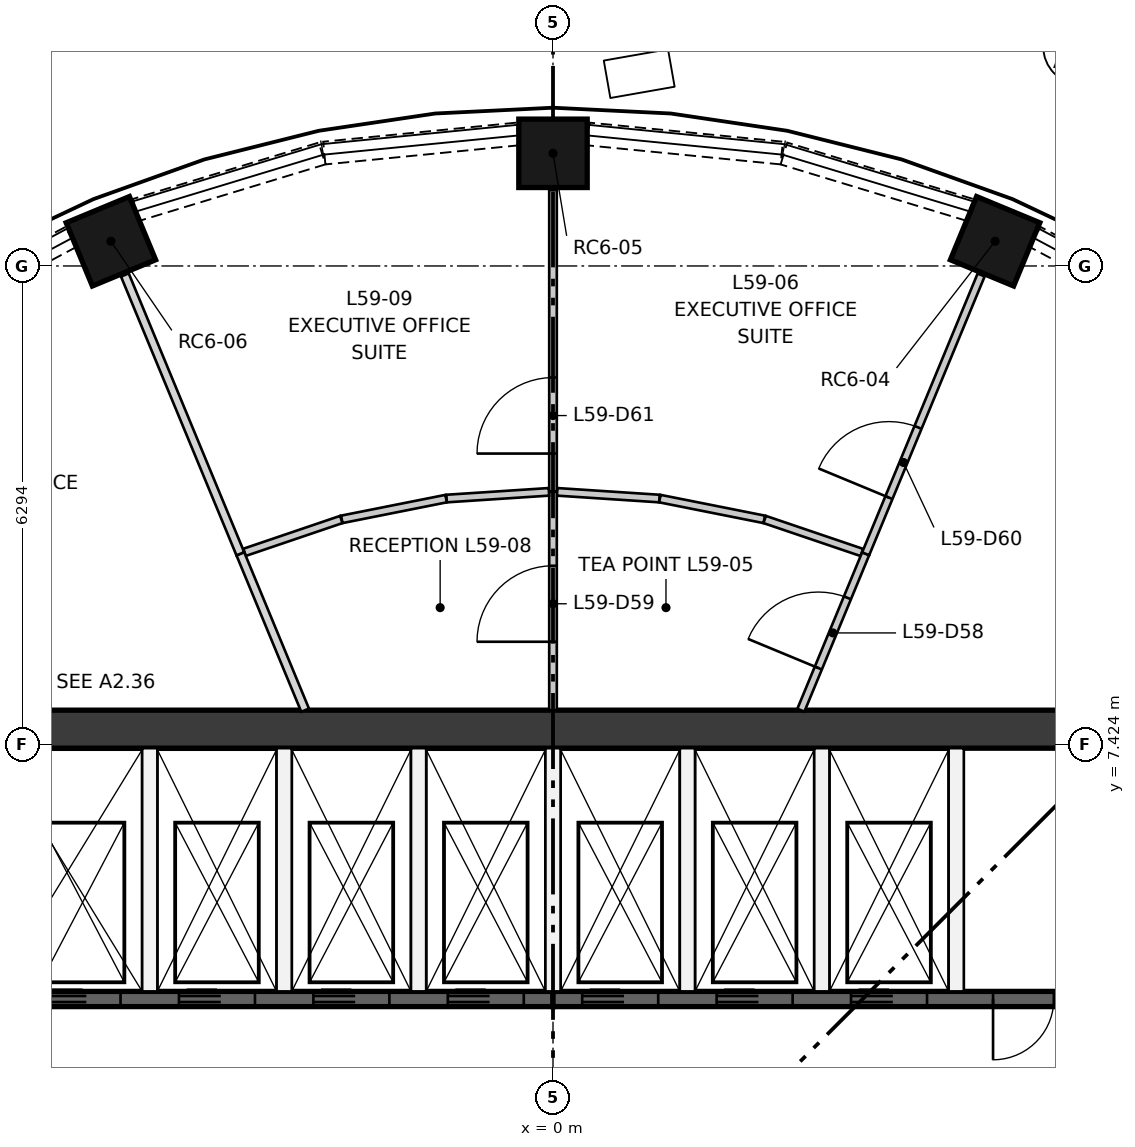
"""IFC4 building model, lengths in metres.
Left out: names, types, materials, properties, quantities, classifications, styles, units other than length and angle.
Written with IfcOpenShell. Run it as: python <this file> out.ifc"""

import sys

from ifc_helpers import new_model, si_unit, direction, frame, frame_2d, origin, origin_2d, place, context, subcontext, project, spatial, rectangle, extrude, element, fill, save


model = new_model("IFC4")
c1 = context("Model", 3, precision=1e-05, world=origin(), true_north=direction((0.0, 1.0)))
c2 = subcontext(c1, "Body", "Model", "MODEL_VIEW")
j1 = project(units=[si_unit("LENGTHUNIT", "METRE"), si_unit("PLANEANGLEUNIT", "RADIAN")], contexts=[c1])
p1 = place(None, origin())
s1 = spatial("IfcSite", under=j1, at=p1, CompositionType="ELEMENT")
p2 = place(p1, origin())
s2 = spatial("IfcBuilding", under=s1, at=p2, CompositionType="ELEMENT")
p3 = place(p2, frame((0.0, 0.0, 217.8)))
s3 = spatial("IfcBuildingStorey", under=s2, at=p3, CompositionType="ELEMENT", Elevation=217.8)
for number, where, z_axis, x_axis in (
    (1, (5.817, 14.043, 0.5), (0.0, 0.0, 1.0), (0.383, 0.924, 0.0)),
    (2, (0.0, 15.2, 0.5), (0.0, 0.0, 1.0), (0.0, 1.0, 0.0)),
    (3, (-5.817, 14.043, 0.5), (0.0, 0.0, 1.0), (-0.383, 0.924, 0.0)),
):
    element("IfcColumn", number, at=place(p3, frame(where, z_axis=z_axis, x_axis=x_axis)), inside=s3, PredefinedType="COLUMN", context=c2, shape_type="SweptSolid", body=[
        extrude(rectangle(XDim=0.9, YDim=0.9, at=origin_2d()), origin(), (0.0, 0.0, 1.0), 2.85),
    ])
p4 = place(p3, frame((-7.874, 7.624, 0.0), z_axis=(0.0, 0.0, 1.0), x_axis=(1.0, 0.0, 0.0)))
e4 = element("IfcWall", 4, at=p4, inside=s3, PredefinedType="SHEAR", context=c2, shape_type="SweptSolid", body=[
    extrude(rectangle(XDim=15.748, YDim=0.5, at=frame_2d((7.874, 0.0))), origin(), (0.0, 0.0, 1.0), 3.35),
])
p5 = place(p3, frame((-7.374, 4.074, 0.0), z_axis=(0.0, 0.0, 1.0), x_axis=(1.0, 0.0, 0.0)))
e5 = element("IfcWall", 5, at=p5, inside=s3, PredefinedType="SHEAR", context=c2, shape_type="SweptSolid", body=[
    extrude(rectangle(XDim=7.374, YDim=0.2, at=frame_2d((3.687, 0.0))), origin(), (0.0, 0.0, 1.0), 3.0),
])
p6 = place(p5, frame((0.684, 0.0, 0.0)))
e6 = element("IfcOpeningElement", 6, at=p6, cuts=e5, PredefinedType="OPENING", context=c2, shape_type="SweptSolid", body=[
    extrude(rectangle(XDim=1.0, YDim=2.1, at=frame_2d((0.5, 1.05))), frame((0.0, 0.11, 0.0), z_axis=(0.0, -1.0, 0.0), x_axis=(1.0, 0.0, 0.0)), (0.0, 0.0, 1.0), 0.22),
])
p7 = place(p5, frame((2.453, 0.0, 0.0)))
e7 = element("IfcOpeningElement", 7, at=p7, cuts=e5, PredefinedType="OPENING", context=c2, shape_type="SweptSolid", body=[
    extrude(rectangle(XDim=1.0, YDim=2.1, at=frame_2d((0.5, 1.05))), frame((0.0, 0.11, 0.0), z_axis=(0.0, -1.0, 0.0), x_axis=(1.0, 0.0, 0.0)), (0.0, 0.0, 1.0), 0.22),
])
p8 = place(p5, frame((4.221, 0.0, 0.0)))
e8 = element("IfcOpeningElement", 8, at=p8, cuts=e5, PredefinedType="OPENING", context=c2, shape_type="SweptSolid", body=[
    extrude(rectangle(XDim=1.0, YDim=2.1, at=frame_2d((0.5, 1.05))), frame((0.0, 0.11, 0.0), z_axis=(0.0, -1.0, 0.0), x_axis=(1.0, 0.0, 0.0)), (0.0, 0.0, 1.0), 0.22),
])
p9 = place(p5, frame((5.99, 0.0, 0.0)))
e9 = element("IfcOpeningElement", 9, at=p9, cuts=e5, PredefinedType="OPENING", context=c2, shape_type="SweptSolid", body=[
    extrude(rectangle(XDim=1.0, YDim=2.1, at=frame_2d((0.5, 1.05))), frame((0.0, 0.11, 0.0), z_axis=(0.0, -1.0, 0.0), x_axis=(1.0, 0.0, 0.0)), (0.0, 0.0, 1.0), 0.22),
])
p10 = place(p3, frame((0.0, 4.074, 0.0), z_axis=(0.0, 0.0, 1.0), x_axis=(1.0, 0.0, 0.0)))
e10 = element("IfcWall", 10, at=p10, inside=s3, PredefinedType="SHEAR", context=c2, shape_type="SweptSolid", body=[
    extrude(rectangle(XDim=7.374, YDim=0.2, at=frame_2d((3.687, 0.0))), origin(), (0.0, 0.0, 1.0), 3.0),
])
p11 = place(p10, frame((0.384, 0.0, 0.0)))
e11 = element("IfcOpeningElement", 11, at=p11, cuts=e10, PredefinedType="OPENING", context=c2, shape_type="SweptSolid", body=[
    extrude(rectangle(XDim=1.0, YDim=2.1, at=frame_2d((0.5, 1.05))), frame((0.0, 0.11, 0.0), z_axis=(0.0, -1.0, 0.0), x_axis=(1.0, 0.0, 0.0)), (0.0, 0.0, 1.0), 0.22),
])
p12 = place(p10, frame((2.153, 0.0, 0.0)))
e12 = element("IfcOpeningElement", 12, at=p12, cuts=e10, PredefinedType="OPENING", context=c2, shape_type="SweptSolid", body=[
    extrude(rectangle(XDim=1.0, YDim=2.1, at=frame_2d((0.5, 1.05))), frame((0.0, 0.11, 0.0), z_axis=(0.0, -1.0, 0.0), x_axis=(1.0, 0.0, 0.0)), (0.0, 0.0, 1.0), 0.22),
])
p13 = place(p10, frame((3.921, 0.0, 0.0)))
e13 = element("IfcOpeningElement", 13, at=p13, cuts=e10, PredefinedType="OPENING", context=c2, shape_type="SweptSolid", body=[
    extrude(rectangle(XDim=1.0, YDim=2.1, at=frame_2d((0.5, 1.05))), frame((0.0, 0.11, 0.0), z_axis=(0.0, -1.0, 0.0), x_axis=(1.0, 0.0, 0.0)), (0.0, 0.0, 1.0), 0.22),
])
p14 = place(p10, frame((5.79, 0.0, 0.0)))
e14 = element("IfcOpeningElement", 14, at=p14, cuts=e10, PredefinedType="OPENING", context=c2, shape_type="SweptSolid", body=[
    extrude(rectangle(XDim=0.8, YDim=2.1, at=frame_2d((0.4, 1.05))), frame((0.0, 0.11, 0.0), z_axis=(0.0, -1.0, 0.0), x_axis=(1.0, 0.0, 0.0)), (0.0, 0.0, 1.0), 0.22),
])
for number, where, z_axis, x_axis in (
    (15, (-5.305, 4.174, 0.0), (0.0, 0.0, 1.0), (0.0, 1.0, 0.0)),
    (16, (-3.537, 4.174, 0.0), (0.0, 0.0, 1.0), (0.0, 1.0, 0.0)),
    (17, (-1.769, 4.174, 0.0), (0.0, 0.0, 1.0), (0.0, 1.0, 0.0)),
    (18, (0.0, 4.174, 0.0), (0.0, 0.0, 1.0), (0.0, 1.0, 0.0)),
    (19, (1.769, 4.174, 0.0), (0.0, 0.0, 1.0), (0.0, 1.0, 0.0)),
    (20, (3.537, 4.174, 0.0), (0.0, 0.0, 1.0), (0.0, 1.0, 0.0)),
    (21, (5.305, 4.174, 0.0), (0.0, 0.0, 1.0), (0.0, 1.0, 0.0)),
):
    element("IfcWall", number, at=place(p3, frame(where, z_axis=z_axis, x_axis=x_axis)), inside=s3, PredefinedType="PARTITIONING", context=c2, shape_type="SweptSolid", body=[
        extrude(rectangle(XDim=3.2, YDim=0.2, at=frame_2d((1.6, 0.0))), origin(), (0.0, 0.0, 1.0), 3.0),
    ])
p15 = place(p3, frame((8.598, 12.894, 0.0), z_axis=(0.0, 0.0, 1.0), x_axis=(-0.881810499649, 0.471603904468, 0.0)))
e22 = element("IfcWall", 22, at=p15, inside=s3, PredefinedType="SOLIDWALL", context=c2, shape_type="SweptSolid", body=[
    extrude(rectangle(XDim=2.557, YDim=0.3, at=frame_2d((1.278, 0.0))), origin(), (0.0, 0.0, 1.0), 0.9),
])
p16 = place(p3, frame((5.486, 14.455, 0.0), z_axis=(0.0, 0.0, 1.0), x_axis=(-0.956960147557, 0.290219358397, 0.0)))
e23 = element("IfcWall", 23, at=p16, inside=s3, PredefinedType="SOLIDWALL", context=c2, shape_type="SweptSolid", body=[
    extrude(rectangle(XDim=2.557, YDim=0.3, at=frame_2d((1.279, 0.0))), origin(), (0.0, 0.0, 1.0), 0.9),
])
for number, where, z_axis, x_axis in (
    (24, (3.009, 15.204, 0.0), (0.0, 0.0, 1.0), (-0.995, 0.098, 0.0)),
    (25, (-0.464, 15.455, 0.0), (0.0, 0.0, 1.0), (-0.995, -0.098, 0.0)),
):
    element("IfcWall", number, at=place(p3, frame(where, z_axis=z_axis, x_axis=x_axis)), inside=s3, PredefinedType="SOLIDWALL", context=c2, shape_type="SweptSolid", body=[
        extrude(rectangle(XDim=2.558, YDim=0.3, at=frame_2d((1.279, 0.0))), origin(), (0.0, 0.0, 1.0), 0.9),
    ])
p17 = place(p3, frame((-3.038, 15.198, 0.0), z_axis=(0.0, 0.0, 1.0), x_axis=(-0.956960147557, -0.290219358397, 0.0)))
e26 = element("IfcWall", 26, at=p17, inside=s3, PredefinedType="SOLIDWALL", context=c2, shape_type="SweptSolid", body=[
    extrude(rectangle(XDim=2.557, YDim=0.3, at=frame_2d((1.279, 0.0))), origin(), (0.0, 0.0, 1.0), 0.9),
])
p18 = place(p3, frame((-6.343, 14.1, 0.0), z_axis=(0.0, 0.0, 1.0), x_axis=(-0.881810499649, -0.471603904468, 0.0)))
e27 = element("IfcWall", 27, at=p18, inside=s3, PredefinedType="SOLIDWALL", context=c2, shape_type="SweptSolid", body=[
    extrude(rectangle(XDim=2.557, YDim=0.3, at=frame_2d((1.278, 0.0))), origin(), (0.0, 0.0, 1.0), 0.9),
])
p19 = place(p3, frame((0.053, 10.747, 0.0), z_axis=(0.0, 0.0, 1.0), x_axis=(0.99785346224, -0.06548639473, 0.0)))
e28 = element("IfcWall", 28, at=p19, inside=s3, PredefinedType="PARTITIONING", context=c2, shape_type="SweptSolid", body=[
    extrude(rectangle(XDim=1.35, YDim=0.1, at=frame_2d((0.675, 0.0))), origin(), (0.0, 0.0, 1.0), 3.0),
])
p20 = place(p3, frame((1.406, 10.657, 0.0), z_axis=(0.0, 0.0, 1.0), x_axis=(0.980761417594, -0.19521025014, 0.0)))
e29 = element("IfcWall", 29, at=p20, inside=s3, PredefinedType="PARTITIONING", context=c2, shape_type="SweptSolid", body=[
    extrude(rectangle(XDim=1.399, YDim=0.1, at=frame_2d((0.7, 0.0))), origin(), (0.0, 0.0, 1.0), 3.0),
])
p21 = place(p3, frame((2.785, 10.383, 0.0), z_axis=(0.0, 0.0, 1.0), x_axis=(0.946968869726, -0.32132531766, 0.0)))
e30 = element("IfcWall", 30, at=p21, inside=s3, PredefinedType="PARTITIONING", context=c2, shape_type="SweptSolid", body=[
    extrude(rectangle(XDim=1.349, YDim=0.1, at=frame_2d((0.675, 0.0))), origin(), (0.0, 0.0, 1.0), 3.0),
])
p22 = place(p3, frame((3.261, 7.874, 0.0), z_axis=(0.0, 0.0, 1.0), x_axis=(0.382684189911, 0.923879218725, 0.0)))
e31 = element("IfcWall", 31, at=p22, inside=s3, PredefinedType="PARTITIONING", context=c2, shape_type="SweptSolid", body=[
    extrude(rectangle(XDim=2.227, YDim=0.1, at=frame_2d((1.114, 0.0))), origin(), (0.0, 0.0, 1.0), 3.0),
])
p23 = place(p22, frame((0.6, 0.0, 0.0)))
e32 = element("IfcOpeningElement", 32, at=p23, cuts=e31, PredefinedType="OPENING", context=c2, shape_type="SweptSolid", body=[
    extrude(rectangle(XDim=1.0, YDim=2.1, at=frame_2d((0.5, 1.05))), frame((0.0, 0.06, 0.0), z_axis=(0.0, -1.0, 0.0), x_axis=(1.0, 0.0, 0.0)), (0.0, 0.0, 1.0), 0.12),
])
p24 = place(p3, frame((0.0, 7.874, 0.0), z_axis=(0.0, 0.0, 1.0), x_axis=(0.0, 1.0, 0.0)))
e33 = element("IfcWall", 33, at=p24, inside=s3, PredefinedType="PARTITIONING", context=c2, shape_type="SweptSolid", body=[
    extrude(rectangle(XDim=2.876, YDim=0.1, at=frame_2d((1.438, 0.0))), origin(), (0.0, 0.0, 1.0), 3.0),
])
p25 = place(p24, frame((0.9, 0.0, 0.0)))
e34 = element("IfcOpeningElement", 34, at=p25, cuts=e33, PredefinedType="OPENING", context=c2, shape_type="SweptSolid", body=[
    extrude(rectangle(XDim=1.0, YDim=2.1, at=frame_2d((0.5, 1.05))), frame((0.0, 0.06, 0.0), z_axis=(0.0, -1.0, 0.0), x_axis=(1.0, 0.0, 0.0)), (0.0, 0.0, 1.0), 0.12),
])
p26 = place(p3, frame((4.114, 9.932, 0.0), z_axis=(0.0, 0.0, 1.0), x_axis=(0.382675844596, 0.923882675432, 0.0)))
e35 = element("IfcWall", 35, at=p26, inside=s3, PredefinedType="PARTITIONING", context=c2, shape_type="SweptSolid", body=[
    extrude(rectangle(XDim=3.97, YDim=0.1, at=frame_2d((1.985, 0.0))), origin(), (0.0, 0.0, 1.0), 3.0),
])
p27 = place(p26, frame((0.8, 0.0, 0.0)))
e36 = element("IfcOpeningElement", 36, at=p27, cuts=e35, PredefinedType="OPENING", context=c2, shape_type="SweptSolid", body=[
    extrude(rectangle(XDim=1.0, YDim=2.1, at=frame_2d((0.5, 1.05))), frame((0.0, 0.06, 0.0), z_axis=(0.0, -1.0, 0.0), x_axis=(1.0, 0.0, 0.0)), (0.0, 0.0, 1.0), 0.12),
])
p28 = place(p3, frame((0.0, 10.75, 0.0), z_axis=(0.0, 0.0, 1.0), x_axis=(0.0, 1.0, 0.0)))
e37 = element("IfcWall", 37, at=p28, inside=s3, PredefinedType="PARTITIONING", context=c2, shape_type="SweptSolid", body=[
    extrude(rectangle(XDim=3.97, YDim=0.1, at=frame_2d((1.985, 0.0))), origin(), (0.0, 0.0, 1.0), 3.0),
])
p29 = place(p28, frame((0.5, 0.0, 0.0)))
e38 = element("IfcOpeningElement", 38, at=p29, cuts=e37, PredefinedType="OPENING", context=c2, shape_type="SweptSolid", body=[
    extrude(rectangle(XDim=1.0, YDim=2.1, at=frame_2d((0.5, 1.05))), frame((0.0, 0.06, 0.0), z_axis=(0.0, -1.0, 0.0), x_axis=(1.0, 0.0, 0.0)), (0.0, 0.0, 1.0), 0.12),
])
p30 = place(p3, frame((-4.059, 9.95, 0.0), z_axis=(0.0, 0.0, 1.0), x_axis=(0.946944164887, 0.321398115407, 0.0)))
e39 = element("IfcWall", 39, at=p30, inside=s3, PredefinedType="PARTITIONING", context=c2, shape_type="SweptSolid", body=[
    extrude(rectangle(XDim=1.344, YDim=0.1, at=frame_2d((0.672, 0.0))), origin(), (0.0, 0.0, 1.0), 3.0),
])
p31 = place(p3, frame((-2.779, 10.384, 0.0), z_axis=(0.0, 0.0, 1.0), x_axis=(0.980761417594, 0.19521025014, 0.0)))
e40 = element("IfcWall", 40, at=p31, inside=s3, PredefinedType="PARTITIONING", context=c2, shape_type="SweptSolid", body=[
    extrude(rectangle(XDim=1.399, YDim=0.1, at=frame_2d((0.7, 0.0))), origin(), (0.0, 0.0, 1.0), 3.0),
])
p32 = place(p3, frame((-1.4, 10.658, 0.0), z_axis=(0.0, 0.0, 1.0), x_axis=(0.99785346224, 0.06548639473, 0.0)))
e41 = element("IfcWall", 41, at=p32, inside=s3, PredefinedType="PARTITIONING", context=c2, shape_type="SweptSolid", body=[
    extrude(rectangle(XDim=1.35, YDim=0.1, at=frame_2d((0.675, 0.0))), origin(), (0.0, 0.0, 1.0), 3.0),
])
p33 = place(p3, frame((-3.261, 7.874, 0.0), z_axis=(0.0, 0.0, 1.0), x_axis=(-0.382684189911, 0.923879218725, 0.0)))
e42 = element("IfcWall", 42, at=p33, inside=s3, PredefinedType="PARTITIONING", context=c2, shape_type="SweptSolid", body=[
    extrude(rectangle(XDim=2.227, YDim=0.11, at=frame_2d((1.114, 0.0))), origin(), (0.0, 0.0, 1.0), 3.0),
])
p34 = place(p3, frame((-4.114, 9.932, 0.0), z_axis=(0.0, 0.0, 1.0), x_axis=(-0.382675844596, 0.923882675432, 0.0)))
e43 = element("IfcWall", 43, at=p34, inside=s3, PredefinedType="PARTITIONING", context=c2, shape_type="SweptSolid", body=[
    extrude(rectangle(XDim=3.97, YDim=0.11, at=frame_2d((1.985, 0.0))), origin(), (0.0, 0.0, 1.0), 3.0),
])
p35 = place(p6, frame((1.0, 0.0, 0.0), z_axis=(0.0, 0.0, 1.0), x_axis=(-1.0, 0.0, 0.0)))
e44 = element("IfcDoor", 44, at=p35, inside=s3, OperationType="DOUBLE_DOOR_SLIDING", PredefinedType="DOOR", context=c2, shape_type="SweptSolid", body=[
    extrude(rectangle(XDim=1.0, YDim=2.1, at=frame_2d((0.5, 1.05))), frame((0.0, 0.025, 0.0), z_axis=(0.0, -1.0, 0.0), x_axis=(1.0, 0.0, 0.0)), (0.0, 0.0, 1.0), 0.05),
])
fill(e6, e44)
p36 = place(p7, frame((1.0, 0.0, 0.0), z_axis=(0.0, 0.0, 1.0), x_axis=(-1.0, 0.0, 0.0)))
e45 = element("IfcDoor", 45, at=p36, inside=s3, OperationType="DOUBLE_DOOR_SLIDING", PredefinedType="DOOR", context=c2, shape_type="SweptSolid", body=[
    extrude(rectangle(XDim=1.0, YDim=2.1, at=frame_2d((0.5, 1.05))), frame((0.0, 0.025, 0.0), z_axis=(0.0, -1.0, 0.0), x_axis=(1.0, 0.0, 0.0)), (0.0, 0.0, 1.0), 0.05),
])
fill(e7, e45)
p37 = place(p8, frame((1.0, 0.0, 0.0), z_axis=(0.0, 0.0, 1.0), x_axis=(-1.0, 0.0, 0.0)))
e46 = element("IfcDoor", 46, at=p37, inside=s3, OperationType="DOUBLE_DOOR_SLIDING", PredefinedType="DOOR", context=c2, shape_type="SweptSolid", body=[
    extrude(rectangle(XDim=1.0, YDim=2.1, at=frame_2d((0.5, 1.05))), frame((0.0, 0.025, 0.0), z_axis=(0.0, -1.0, 0.0), x_axis=(1.0, 0.0, 0.0)), (0.0, 0.0, 1.0), 0.05),
])
fill(e8, e46)
p38 = place(p9, frame((1.0, 0.0, 0.0), z_axis=(0.0, 0.0, 1.0), x_axis=(-1.0, 0.0, 0.0)))
e47 = element("IfcDoor", 47, at=p38, inside=s3, OperationType="DOUBLE_DOOR_SLIDING", PredefinedType="DOOR", context=c2, shape_type="SweptSolid", body=[
    extrude(rectangle(XDim=1.0, YDim=2.1, at=frame_2d((0.5, 1.05))), frame((0.0, 0.025, 0.0), z_axis=(0.0, -1.0, 0.0), x_axis=(1.0, 0.0, 0.0)), (0.0, 0.0, 1.0), 0.05),
])
fill(e9, e47)
p39 = place(p11, frame((1.0, 0.0, 0.0), z_axis=(0.0, 0.0, 1.0), x_axis=(-1.0, 0.0, 0.0)))
e48 = element("IfcDoor", 48, at=p39, inside=s3, OperationType="DOUBLE_DOOR_SLIDING", PredefinedType="DOOR", context=c2, shape_type="SweptSolid", body=[
    extrude(rectangle(XDim=1.0, YDim=2.1, at=frame_2d((0.5, 1.05))), frame((0.0, 0.025, 0.0), z_axis=(0.0, -1.0, 0.0), x_axis=(1.0, 0.0, 0.0)), (0.0, 0.0, 1.0), 0.05),
])
fill(e11, e48)
p40 = place(p12, frame((1.0, 0.0, 0.0), z_axis=(0.0, 0.0, 1.0), x_axis=(-1.0, 0.0, 0.0)))
e49 = element("IfcDoor", 49, at=p40, inside=s3, OperationType="DOUBLE_DOOR_SLIDING", PredefinedType="DOOR", context=c2, shape_type="SweptSolid", body=[
    extrude(rectangle(XDim=1.0, YDim=2.1, at=frame_2d((0.5, 1.05))), frame((0.0, 0.025, 0.0), z_axis=(0.0, -1.0, 0.0), x_axis=(1.0, 0.0, 0.0)), (0.0, 0.0, 1.0), 0.05),
])
fill(e12, e49)
p41 = place(p13, frame((1.0, 0.0, 0.0), z_axis=(0.0, 0.0, 1.0), x_axis=(-1.0, 0.0, 0.0)))
e50 = element("IfcDoor", 50, at=p41, inside=s3, OperationType="DOUBLE_DOOR_SLIDING", PredefinedType="DOOR", context=c2, shape_type="SweptSolid", body=[
    extrude(rectangle(XDim=1.0, YDim=2.1, at=frame_2d((0.5, 1.05))), frame((0.0, 0.025, 0.0), z_axis=(0.0, -1.0, 0.0), x_axis=(1.0, 0.0, 0.0)), (0.0, 0.0, 1.0), 0.05),
])
fill(e13, e50)
p42 = place(p14, frame((0.8, 0.0, 0.0), z_axis=(0.0, 0.0, 1.0), x_axis=(-1.0, 0.0, 0.0)))
e51 = element("IfcDoor", 51, at=p42, inside=s3, OperationType="SINGLE_SWING_LEFT", PredefinedType="DOOR", context=c2, shape_type="SweptSolid", body=[
    extrude(rectangle(XDim=0.8, YDim=2.1, at=frame_2d((0.4, 1.05))), frame((0.0, 0.025, 0.0), z_axis=(0.0, -1.0, 0.0), x_axis=(1.0, 0.0, 0.0)), (0.0, 0.0, 1.0), 0.05),
])
fill(e14, e51)
p43 = place(p23, origin())
e52 = element("IfcDoor", 52, at=p43, inside=s3, OperationType="SINGLE_SWING_LEFT", PredefinedType="DOOR", context=c2, shape_type="SweptSolid", body=[
    extrude(rectangle(XDim=1.0, YDim=2.1, at=frame_2d((0.5, 1.05))), frame((0.0, 0.025, 0.0), z_axis=(0.0, -1.0, 0.0), x_axis=(1.0, 0.0, 0.0)), (0.0, 0.0, 1.0), 0.05),
])
fill(e32, e52)
p44 = place(p25, origin())
e53 = element("IfcDoor", 53, at=p44, inside=s3, OperationType="SINGLE_SWING_LEFT", PredefinedType="DOOR", context=c2, shape_type="SweptSolid", body=[
    extrude(rectangle(XDim=1.0, YDim=2.1, at=frame_2d((0.5, 1.05))), frame((0.0, 0.025, 0.0), z_axis=(0.0, -1.0, 0.0), x_axis=(1.0, 0.0, 0.0)), (0.0, 0.0, 1.0), 0.05),
])
fill(e34, e53)
p45 = place(p27, origin())
e54 = element("IfcDoor", 54, at=p45, inside=s3, OperationType="SINGLE_SWING_LEFT", PredefinedType="DOOR", context=c2, shape_type="SweptSolid", body=[
    extrude(rectangle(XDim=1.0, YDim=2.1, at=frame_2d((0.5, 1.05))), frame((0.0, 0.025, 0.0), z_axis=(0.0, -1.0, 0.0), x_axis=(1.0, 0.0, 0.0)), (0.0, 0.0, 1.0), 0.05),
])
fill(e36, e54)
p46 = place(p29, origin())
e55 = element("IfcDoor", 55, at=p46, inside=s3, OperationType="SINGLE_SWING_LEFT", PredefinedType="DOOR", context=c2, shape_type="SweptSolid", body=[
    extrude(rectangle(XDim=1.0, YDim=2.1, at=frame_2d((0.5, 1.05))), frame((0.0, 0.025, 0.0), z_axis=(0.0, -1.0, 0.0), x_axis=(1.0, 0.0, 0.0)), (0.0, 0.0, 1.0), 0.05),
])
fill(e38, e55)
save(model, sys.argv[1])
